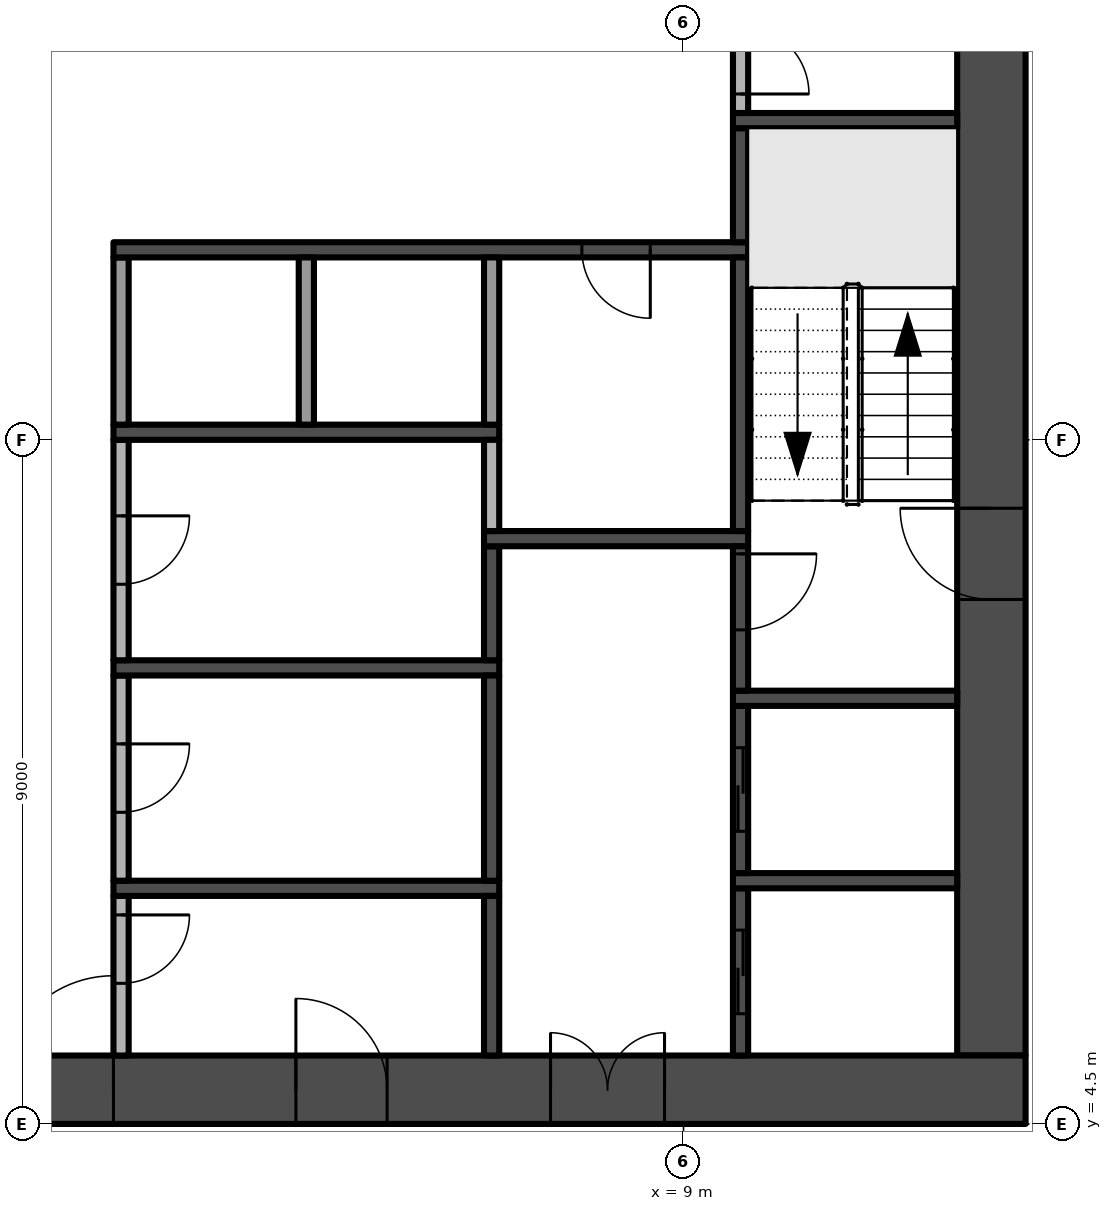
"""IFC4 building model, lengths in metres.
Left out: names, types, materials, properties, quantities, classifications, styles, units other than length and angle.
Written with IfcOpenShell. Run it as: python <this file> out.ifc"""

import sys

from ifc_helpers import new_model, si_unit, direction, frame, frame_2d, origin, place, context, subcontext, project, spatial, rectangle, extrude, element, fill, save


model = new_model("IFC4")
c1 = context("Model", 3, precision=1e-05, world=origin(), true_north=direction((0.0, 1.0)))
c2 = subcontext(c1, "Body", "Model", "MODEL_VIEW")
j1 = project(units=[si_unit("LENGTHUNIT", "METRE"), si_unit("PLANEANGLEUNIT", "RADIAN")], contexts=[c1])
p1 = place(None, origin())
s1 = spatial("IfcSite", under=j1, at=p1, CompositionType="ELEMENT")
p2 = place(p1, origin())
s2 = spatial("IfcBuilding", under=s1, at=p2, CompositionType="ELEMENT")
p3 = place(p2, frame((0.0, 0.0, 84.6)))
s3 = spatial("IfcBuildingStorey", under=s2, at=p3, CompositionType="ELEMENT", Elevation=84.6)
p4 = place(p3, frame((-13.5, 4.95, -0.3), z_axis=(0.0, 0.0, 1.0), x_axis=(1.0, 0.0, 0.0)))
e1 = element("IfcWall", 1, at=p4, inside=s3, PredefinedType="SHEAR", context=c2, shape_type="SweptSolid", body=[
    extrude(rectangle(XDim=27.0, YDim=0.9, at=frame_2d((13.5, 0.0))), origin(), (0.0, 0.0, 1.0), 3.8),
])
p5 = place(p4, frame((12.0, 0.0, 0.3)))
e2 = element("IfcOpeningElement", 2, at=p5, cuts=e1, PredefinedType="OPENING", context=c2, shape_type="SweptSolid", body=[
    extrude(rectangle(XDim=3.0, YDim=2.4, at=frame_2d((1.5, 1.2))), frame((0.0, 0.46, 0.0), z_axis=(0.0, -1.0, 0.0), x_axis=(1.0, 0.0, 0.0)), (0.0, 0.0, 1.0), 0.92),
])
p6 = place(p4, frame((4.9, 0.0, 0.3)))
e3 = element("IfcOpeningElement", 3, at=p6, cuts=e1, PredefinedType="OPENING", context=c2, shape_type="SweptSolid", body=[
    extrude(rectangle(XDim=1.2, YDim=2.2, at=frame_2d((0.6, 1.1))), frame((0.0, 0.46, 0.0), z_axis=(0.0, -1.0, 0.0), x_axis=(1.0, 0.0, 0.0)), (0.0, 0.0, 1.0), 0.92),
])
p7 = place(p4, frame((20.75, 0.0, 0.3)))
e4 = element("IfcOpeningElement", 4, at=p7, cuts=e1, PredefinedType="OPENING", context=c2, shape_type="SweptSolid", body=[
    extrude(rectangle(XDim=1.5, YDim=2.2, at=frame_2d((0.75, 1.1))), frame((0.0, 0.46, 0.0), z_axis=(0.0, -1.0, 0.0), x_axis=(1.0, 0.0, 0.0)), (0.0, 0.0, 1.0), 0.92),
])
p8 = place(p4, frame((17.4, 0.0, 0.3)))
e5 = element("IfcOpeningElement", 5, at=p8, cuts=e1, PredefinedType="OPENING", context=c2, shape_type="SweptSolid", body=[
    extrude(rectangle(XDim=1.2, YDim=2.2, at=frame_2d((0.6, 1.1))), frame((0.0, 0.46, 0.0), z_axis=(0.0, -1.0, 0.0), x_axis=(1.0, 0.0, 0.0)), (0.0, 0.0, 1.0), 0.92),
])
p9 = place(p3, frame((13.05, 5.4, -0.3), z_axis=(0.0, 0.0, 1.0), x_axis=(0.0, 1.0, 0.0)))
e6 = element("IfcWall", 6, at=p9, inside=s3, PredefinedType="SHEAR", context=c2, shape_type="SweptSolid", body=[
    extrude(rectangle(XDim=16.2, YDim=0.9, at=frame_2d((8.1, 0.0))), origin(), (0.0, 0.0, 1.0), 3.8),
])
p10 = place(p9, frame((6.0, 0.0, 0.3)))
e7 = element("IfcOpeningElement", 7, at=p10, cuts=e6, PredefinedType="OPENING", context=c2, shape_type="SweptSolid", body=[
    extrude(rectangle(XDim=1.2, YDim=2.2, at=frame_2d((0.6, 1.1))), frame((0.0, 0.46, 0.0), z_axis=(0.0, -1.0, 0.0), x_axis=(1.0, 0.0, 0.0)), (0.0, 0.0, 1.0), 0.92),
])
p11 = place(p3, frame((1.6, 7.5, 0.0), z_axis=(0.0, 0.0, 1.0), x_axis=(0.0, -1.0, 0.0)))
e8 = element("IfcWall", 8, at=p11, inside=s3, PredefinedType="PARTITIONING", context=c2, shape_type="SweptSolid", body=[
    extrude(rectangle(XDim=2.1, YDim=0.2, at=frame_2d((1.05, 0.0))), origin(), (0.0, 0.0, 1.0), 3.5),
])
p12 = place(p11, frame((0.25, 0.0, 0.0)))
e9 = element("IfcOpeningElement", 9, at=p12, cuts=e8, PredefinedType="OPENING", context=c2, shape_type="SweptSolid", body=[
    extrude(rectangle(XDim=0.9, YDim=2.1, at=frame_2d((0.45, 1.05))), frame((0.0, 0.11, 0.0), z_axis=(0.0, -1.0, 0.0), x_axis=(1.0, 0.0, 0.0)), (0.0, 0.0, 1.0), 0.22),
])
p13 = place(p3, frame((1.5, 7.6, 0.0), z_axis=(0.0, 0.0, 1.0), x_axis=(1.0, 0.0, 0.0)))
e10 = element("IfcWall", 10, at=p13, inside=s3, PredefinedType="SHEAR", context=c2, shape_type="SweptSolid", body=[
    extrude(rectangle(XDim=5.075, YDim=0.2, at=frame_2d((2.538, 0.0))), origin(), (0.0, 0.0, 1.0), 3.5),
])
p14 = place(p3, frame((1.6, 10.4, 0.0), z_axis=(0.0, 0.0, 1.0), x_axis=(0.0, -1.0, 0.0)))
e11 = element("IfcWall", 11, at=p14, inside=s3, PredefinedType="PARTITIONING", context=c2, shape_type="SweptSolid", body=[
    extrude(rectangle(XDim=2.7, YDim=0.2, at=frame_2d((1.35, 0.0))), origin(), (0.0, 0.0, 1.0), 3.5),
])
p15 = place(p14, frame((0.9, 0.0, 0.0)))
e12 = element("IfcOpeningElement", 12, at=p15, cuts=e11, PredefinedType="OPENING", context=c2, shape_type="SweptSolid", body=[
    extrude(rectangle(XDim=0.9, YDim=2.1, at=frame_2d((0.45, 1.05))), frame((0.0, 0.11, 0.0), z_axis=(0.0, -1.0, 0.0), x_axis=(1.0, 0.0, 0.0)), (0.0, 0.0, 1.0), 0.22),
])
p16 = place(p3, frame((1.5, 10.5, 0.0), z_axis=(0.0, 0.0, 1.0), x_axis=(1.0, 0.0, 0.0)))
e13 = element("IfcWall", 13, at=p16, inside=s3, PredefinedType="SHEAR", context=c2, shape_type="SweptSolid", body=[
    extrude(rectangle(XDim=5.075, YDim=0.2, at=frame_2d((2.538, 0.0))), origin(), (0.0, 0.0, 1.0), 3.5),
])
p17 = place(p3, frame((1.6, 13.5, 0.0), z_axis=(0.0, 0.0, 1.0), x_axis=(0.0, -1.0, 0.0)))
e14 = element("IfcWall", 14, at=p17, inside=s3, PredefinedType="PARTITIONING", context=c2, shape_type="SweptSolid", body=[
    extrude(rectangle(XDim=2.9, YDim=0.2, at=frame_2d((1.45, 0.0))), origin(), (0.0, 0.0, 1.0), 3.5),
])
p18 = place(p17, frame((1.0, 0.0, 0.0)))
e15 = element("IfcOpeningElement", 15, at=p18, cuts=e14, PredefinedType="OPENING", context=c2, shape_type="SweptSolid", body=[
    extrude(rectangle(XDim=0.9, YDim=2.1, at=frame_2d((0.45, 1.05))), frame((0.0, 0.11, 0.0), z_axis=(0.0, -1.0, 0.0), x_axis=(1.0, 0.0, 0.0)), (0.0, 0.0, 1.0), 0.22),
])
p19 = place(p3, frame((1.5, 13.6, 0.0), z_axis=(0.0, 0.0, 1.0), x_axis=(1.0, 0.0, 0.0)))
e16 = element("IfcWall", 16, at=p19, inside=s3, PredefinedType="SHEAR", context=c2, shape_type="SweptSolid", body=[
    extrude(rectangle(XDim=5.075, YDim=0.2, at=frame_2d((2.538, 0.0))), origin(), (0.0, 0.0, 1.0), 3.5),
])
p20 = place(p3, frame((1.6, 13.7, 0.0), z_axis=(0.0, 0.0, 1.0), x_axis=(0.0, 1.0, 0.0)))
e17 = element("IfcWall", 17, at=p20, inside=s3, PredefinedType="PARTITIONING", context=c2, shape_type="SweptSolid", body=[
    extrude(rectangle(XDim=2.2, YDim=0.2, at=frame_2d((1.1, 0.0))), origin(), (0.0, 0.0, 1.0), 3.5),
])
p21 = place(p3, frame((9.85, 16.0, 0.0), z_axis=(0.0, 0.0, 1.0), x_axis=(-1.0, 0.0, 0.0)))
e18 = element("IfcWall", 18, at=p21, inside=s3, PredefinedType="SHEAR", context=c2, shape_type="SweptSolid", body=[
    extrude(rectangle(XDim=8.35, YDim=0.2, at=frame_2d((4.175, 0.0))), origin(), (0.0, 0.0, 1.0), 3.5),
])
p22 = place(p21, frame((1.288, 0.0, 0.0)))
e19 = element("IfcOpeningElement", 19, at=p22, cuts=e18, PredefinedType="OPENING", context=c2, shape_type="SweptSolid", body=[
    extrude(rectangle(XDim=0.9, YDim=2.1, at=frame_2d((0.45, 1.05))), frame((0.0, 0.11, 0.0), z_axis=(0.0, -1.0, 0.0), x_axis=(1.0, 0.0, 0.0)), (0.0, 0.0, 1.0), 0.22),
])
p23 = place(p3, frame((4.037, 13.7, 0.0), z_axis=(0.0, 0.0, 1.0), x_axis=(0.0, 1.0, 0.0)))
e20 = element("IfcWall", 20, at=p23, inside=s3, PredefinedType="PARTITIONING", context=c2, shape_type="SweptSolid", body=[
    extrude(rectangle(XDim=2.2, YDim=0.2, at=frame_2d((1.1, 0.0))), origin(), (0.0, 0.0, 1.0), 3.5),
])
p24 = place(p3, frame((6.475, 5.4, 0.0), z_axis=(0.0, 0.0, 1.0), x_axis=(0.0, 1.0, 0.0)))
e21 = element("IfcWall", 21, at=p24, inside=s3, PredefinedType="SHEAR", context=c2, shape_type="SweptSolid", body=[
    extrude(rectangle(XDim=2.1, YDim=0.2, at=frame_2d((1.05, 0.0))), origin(), (0.0, 0.0, 1.0), 3.5),
])
p25 = place(p3, frame((6.475, 7.7, 0.0), z_axis=(0.0, 0.0, 1.0), x_axis=(0.0, 1.0, 0.0)))
e22 = element("IfcWall", 22, at=p25, inside=s3, PredefinedType="SHEAR", context=c2, shape_type="SweptSolid", body=[
    extrude(rectangle(XDim=2.7, YDim=0.2, at=frame_2d((1.35, 0.0))), origin(), (0.0, 0.0, 1.0), 3.5),
])
p26 = place(p3, frame((6.475, 10.6, 0.0), z_axis=(0.0, 0.0, 1.0), x_axis=(0.0, 1.0, 0.0)))
e23 = element("IfcWall", 23, at=p26, inside=s3, PredefinedType="SHEAR", context=c2, shape_type="SweptSolid", body=[
    extrude(rectangle(XDim=1.5, YDim=0.2, at=frame_2d((0.75, 0.0))), origin(), (0.0, 0.0, 1.0), 3.5),
])
p27 = place(p3, frame((6.375, 12.2, 0.0), z_axis=(0.0, 0.0, 1.0), x_axis=(1.0, 0.0, 0.0)))
e24 = element("IfcWall", 24, at=p27, inside=s3, PredefinedType="SHEAR", context=c2, shape_type="SweptSolid", body=[
    extrude(rectangle(XDim=3.475, YDim=0.2, at=frame_2d((1.738, 0.0))), origin(), (0.0, 0.0, 1.0), 3.5),
])
p28 = place(p3, frame((6.475, 12.3, 0.0), z_axis=(0.0, 0.0, 1.0), x_axis=(0.0, 1.0, 0.0)))
e25 = element("IfcWall", 25, at=p28, inside=s3, PredefinedType="PARTITIONING", context=c2, shape_type="SweptSolid", body=[
    extrude(rectangle(XDim=1.2, YDim=0.2, at=frame_2d((0.6, 0.0))), origin(), (0.0, 0.0, 1.0), 3.5),
])
p29 = place(p3, frame((6.475, 13.7, 0.0), z_axis=(0.0, 0.0, 1.0), x_axis=(0.0, 1.0, 0.0)))
e26 = element("IfcWall", 26, at=p29, inside=s3, PredefinedType="PARTITIONING", context=c2, shape_type="SweptSolid", body=[
    extrude(rectangle(XDim=2.2, YDim=0.2, at=frame_2d((1.1, 0.0))), origin(), (0.0, 0.0, 1.0), 3.5),
])
p30 = place(p3, frame((9.75, 5.4, 0.0), z_axis=(0.0, 0.0, 1.0), x_axis=(0.0, 1.0, 0.0)))
e27 = element("IfcWall", 27, at=p30, inside=s3, PredefinedType="SHEAR", context=c2, shape_type="SweptSolid", body=[
    extrude(rectangle(XDim=2.2, YDim=0.2, at=frame_2d((1.1, 0.0))), origin(), (0.0, 0.0, 1.0), 3.5),
])
p31 = place(p30, frame((0.55, 0.0, 0.0)))
e28 = element("IfcOpeningElement", 28, at=p31, cuts=e27, PredefinedType="OPENING", context=c2, shape_type="SweptSolid", body=[
    extrude(rectangle(XDim=1.1, YDim=2.1, at=frame_2d((0.55, 1.05))), frame((0.0, 0.11, 0.0), z_axis=(0.0, -1.0, 0.0), x_axis=(1.0, 0.0, 0.0)), (0.0, 0.0, 1.0), 0.22),
])
p32 = place(p3, frame((9.65, 7.7, 0.0), z_axis=(0.0, 0.0, 1.0), x_axis=(1.0, 0.0, 0.0)))
e29 = element("IfcWall", 29, at=p32, inside=s3, PredefinedType="SHEAR", context=c2, shape_type="SweptSolid", body=[
    extrude(rectangle(XDim=2.95, YDim=0.2, at=frame_2d((1.475, 0.0))), origin(), (0.0, 0.0, 1.0), 3.5),
])
p33 = place(p3, frame((9.75, 7.8, 0.0), z_axis=(0.0, 0.0, 1.0), x_axis=(0.0, 1.0, 0.0)))
e30 = element("IfcWall", 30, at=p33, inside=s3, PredefinedType="SHEAR", context=c2, shape_type="SweptSolid", body=[
    extrude(rectangle(XDim=2.2, YDim=0.2, at=frame_2d((1.1, 0.0))), origin(), (0.0, 0.0, 1.0), 3.5),
])
p34 = place(p33, frame((0.55, 0.0, 0.0)))
e31 = element("IfcOpeningElement", 31, at=p34, cuts=e30, PredefinedType="OPENING", context=c2, shape_type="SweptSolid", body=[
    extrude(rectangle(XDim=1.1, YDim=2.1, at=frame_2d((0.55, 1.05))), frame((0.0, 0.11, 0.0), z_axis=(0.0, -1.0, 0.0), x_axis=(1.0, 0.0, 0.0)), (0.0, 0.0, 1.0), 0.22),
])
p35 = place(p3, frame((9.65, 10.1, 0.0), z_axis=(0.0, 0.0, 1.0), x_axis=(1.0, 0.0, 0.0)))
e32 = element("IfcWall", 32, at=p35, inside=s3, PredefinedType="SHEAR", context=c2, shape_type="SweptSolid", body=[
    extrude(rectangle(XDim=2.95, YDim=0.2, at=frame_2d((1.475, 0.0))), origin(), (0.0, 0.0, 1.0), 3.5),
])
p36 = place(p3, frame((9.75, 12.1, 0.0), z_axis=(0.0, 0.0, 1.0), x_axis=(0.0, -1.0, 0.0)))
e33 = element("IfcWall", 33, at=p36, inside=s3, PredefinedType="SHEAR", context=c2, shape_type="SweptSolid", body=[
    extrude(rectangle(XDim=1.9, YDim=0.2, at=frame_2d((0.95, 0.0))), origin(), (0.0, 0.0, 1.0), 3.5),
])
p37 = place(p36, frame((0.1, 0.0, 0.0)))
e34 = element("IfcOpeningElement", 34, at=p37, cuts=e33, PredefinedType="OPENING", context=c2, shape_type="SweptSolid", body=[
    extrude(rectangle(XDim=1.0, YDim=2.2, at=frame_2d((0.5, 1.1))), frame((0.0, 0.11, 0.0), z_axis=(0.0, -1.0, 0.0), x_axis=(1.0, 0.0, 0.0)), (0.0, 0.0, 1.0), 0.22),
])
p38 = place(p3, frame((9.75, 12.3, 0.0), z_axis=(0.0, 0.0, 1.0), x_axis=(0.0, 1.0, 0.0)))
e35 = element("IfcWall", 35, at=p38, inside=s3, PredefinedType="SHEAR", context=c2, shape_type="SweptSolid", body=[
    extrude(rectangle(XDim=3.6, YDim=0.2, at=frame_2d((1.8, 0.0))), origin(), (0.0, 0.0, 1.0), 3.5),
])
p39 = place(p3, frame((9.75, 16.1, 0.0), z_axis=(0.0, 0.0, 1.0), x_axis=(0.0, 1.0, 0.0)))
e36 = element("IfcWall", 36, at=p39, inside=s3, PredefinedType="SHEAR", context=c2, shape_type="SweptSolid", body=[
    extrude(rectangle(XDim=1.5, YDim=0.2, at=frame_2d((0.75, 0.0))), origin(), (0.0, 0.0, 1.0), 3.5),
])
p40 = place(p3, frame((9.65, 17.7, 0.0), z_axis=(0.0, 0.0, 1.0), x_axis=(1.0, 0.0, 0.0)))
e37 = element("IfcWall", 37, at=p40, inside=s3, PredefinedType="SHEAR", context=c2, shape_type="SweptSolid", body=[
    extrude(rectangle(XDim=2.95, YDim=0.2, at=frame_2d((1.475, 0.0))), origin(), (0.0, 0.0, 1.0), 3.5),
])
p41 = place(p3, frame((9.75, 19.2, 0.0), z_axis=(0.0, 0.0, 1.0), x_axis=(0.0, -1.0, 0.0)))
e38 = element("IfcWall", 38, at=p41, inside=s3, PredefinedType="PARTITIONING", context=c2, shape_type="SweptSolid", body=[
    extrude(rectangle(XDim=1.4, YDim=0.2, at=frame_2d((0.7, 0.0))), origin(), (0.0, 0.0, 1.0), 3.5),
])
p42 = place(p41, frame((0.25, 0.0, 0.0)))
e39 = element("IfcOpeningElement", 39, at=p42, cuts=e38, PredefinedType="OPENING", context=c2, shape_type="SweptSolid", body=[
    extrude(rectangle(XDim=0.9, YDim=2.1, at=frame_2d((0.45, 1.05))), frame((0.0, 0.11, 0.0), z_axis=(0.0, -1.0, 0.0), x_axis=(1.0, 0.0, 0.0)), (0.0, 0.0, 1.0), 0.22),
])
p43 = place(p5, frame((3.0, 0.0, 0.0), z_axis=(0.0, 0.0, 1.0), x_axis=(-1.0, 0.0, 0.0)))
e40 = element("IfcDoor", 40, at=p43, inside=s3, OperationType="DOUBLE_DOOR_SINGLE_SWING", PredefinedType="DOOR", context=c2, shape_type="SweptSolid", body=[
    extrude(rectangle(XDim=3.0, YDim=2.4, at=frame_2d((1.5, 1.2))), frame((0.0, 0.025, 0.0), z_axis=(0.0, -1.0, 0.0), x_axis=(1.0, 0.0, 0.0)), (0.0, 0.0, 1.0), 0.05),
])
fill(e2, e40)
p44 = place(p10, frame((1.2, 0.0, 0.0), z_axis=(0.0, 0.0, 1.0), x_axis=(-1.0, 0.0, 0.0)))
e41 = element("IfcDoor", 41, at=p44, inside=s3, OperationType="SINGLE_SWING_LEFT", PredefinedType="DOOR", context=c2, shape_type="SweptSolid", body=[
    extrude(rectangle(XDim=1.2, YDim=2.2, at=frame_2d((0.6, 1.1))), frame((0.0, 0.025, 0.0), z_axis=(0.0, -1.0, 0.0), x_axis=(1.0, 0.0, 0.0)), (0.0, 0.0, 1.0), 0.05),
])
fill(e7, e41)
p45 = place(p7, frame((1.5, 0.0, 0.0), z_axis=(0.0, 0.0, 1.0), x_axis=(-1.0, 0.0, 0.0)))
e42 = element("IfcDoor", 42, at=p45, inside=s3, OperationType="DOUBLE_DOOR_SINGLE_SWING", PredefinedType="DOOR", context=c2, shape_type="SweptSolid", body=[
    extrude(rectangle(XDim=1.5, YDim=2.2, at=frame_2d((0.75, 1.1))), frame((0.0, 0.025, 0.0), z_axis=(0.0, -1.0, 0.0), x_axis=(1.0, 0.0, 0.0)), (0.0, 0.0, 1.0), 0.05),
])
fill(e4, e42)
p46 = place(p8, frame((1.2, 0.0, 0.0), z_axis=(0.0, 0.0, 1.0), x_axis=(-1.0, 0.0, 0.0)))
e43 = element("IfcDoor", 43, at=p46, inside=s3, OperationType="SINGLE_SWING_RIGHT", PredefinedType="DOOR", context=c2, shape_type="SweptSolid", body=[
    extrude(rectangle(XDim=1.2, YDim=2.2, at=frame_2d((0.6, 1.1))), frame((0.0, 0.025, 0.0), z_axis=(0.0, -1.0, 0.0), x_axis=(1.0, 0.0, 0.0)), (0.0, 0.0, 1.0), 0.05),
])
fill(e5, e43)
p47 = place(p37, origin())
e44 = element("IfcDoor", 44, at=p47, inside=s3, OperationType="SINGLE_SWING_LEFT", PredefinedType="DOOR", context=c2, shape_type="SweptSolid", body=[
    extrude(rectangle(XDim=1.0, YDim=2.2, at=frame_2d((0.5, 1.1))), frame((0.0, 0.025, 0.0), z_axis=(0.0, -1.0, 0.0), x_axis=(1.0, 0.0, 0.0)), (0.0, 0.0, 1.0), 0.05),
])
fill(e34, e44)
p48 = place(p31, origin())
e45 = element("IfcDoor", 45, at=p48, inside=s3, OperationType="SLIDING_TO_RIGHT", PredefinedType="DOOR", context=c2, shape_type="SweptSolid", body=[
    extrude(rectangle(XDim=1.1, YDim=2.1, at=frame_2d((0.55, 1.05))), frame((0.0, 0.025, 0.0), z_axis=(0.0, -1.0, 0.0), x_axis=(1.0, 0.0, 0.0)), (0.0, 0.0, 1.0), 0.05),
])
fill(e28, e45)
p49 = place(p34, origin())
e46 = element("IfcDoor", 46, at=p49, inside=s3, OperationType="SLIDING_TO_RIGHT", PredefinedType="DOOR", context=c2, shape_type="SweptSolid", body=[
    extrude(rectangle(XDim=1.1, YDim=2.1, at=frame_2d((0.55, 1.05))), frame((0.0, 0.025, 0.0), z_axis=(0.0, -1.0, 0.0), x_axis=(1.0, 0.0, 0.0)), (0.0, 0.0, 1.0), 0.05),
])
fill(e31, e46)
p50 = place(p12, origin())
e47 = element("IfcDoor", 47, at=p50, inside=s3, OperationType="SINGLE_SWING_LEFT", PredefinedType="DOOR", context=c2, shape_type="SweptSolid", body=[
    extrude(rectangle(XDim=0.9, YDim=2.1, at=frame_2d((0.45, 1.05))), frame((0.0, 0.025, 0.0), z_axis=(0.0, -1.0, 0.0), x_axis=(1.0, 0.0, 0.0)), (0.0, 0.0, 1.0), 0.05),
])
fill(e9, e47)
p51 = place(p15, origin())
e48 = element("IfcDoor", 48, at=p51, inside=s3, OperationType="SINGLE_SWING_LEFT", PredefinedType="DOOR", context=c2, shape_type="SweptSolid", body=[
    extrude(rectangle(XDim=0.9, YDim=2.1, at=frame_2d((0.45, 1.05))), frame((0.0, 0.025, 0.0), z_axis=(0.0, -1.0, 0.0), x_axis=(1.0, 0.0, 0.0)), (0.0, 0.0, 1.0), 0.05),
])
fill(e12, e48)
p52 = place(p18, origin())
e49 = element("IfcDoor", 49, at=p52, inside=s3, OperationType="SINGLE_SWING_LEFT", PredefinedType="DOOR", context=c2, shape_type="SweptSolid", body=[
    extrude(rectangle(XDim=0.9, YDim=2.1, at=frame_2d((0.45, 1.05))), frame((0.0, 0.025, 0.0), z_axis=(0.0, -1.0, 0.0), x_axis=(1.0, 0.0, 0.0)), (0.0, 0.0, 1.0), 0.05),
])
fill(e15, e49)
p53 = place(p22, origin())
e50 = element("IfcDoor", 50, at=p53, inside=s3, OperationType="SINGLE_SWING_LEFT", PredefinedType="DOOR", context=c2, shape_type="SweptSolid", body=[
    extrude(rectangle(XDim=0.9, YDim=2.1, at=frame_2d((0.45, 1.05))), frame((0.0, 0.025, 0.0), z_axis=(0.0, -1.0, 0.0), x_axis=(1.0, 0.0, 0.0)), (0.0, 0.0, 1.0), 0.05),
])
fill(e19, e50)
p54 = place(p42, origin())
e51 = element("IfcDoor", 51, at=p54, inside=s3, OperationType="SINGLE_SWING_RIGHT", PredefinedType="DOOR", context=c2, shape_type="SweptSolid", body=[
    extrude(rectangle(XDim=0.9, YDim=2.1, at=frame_2d((0.45, 1.05))), frame((0.0, 0.025, 0.0), z_axis=(0.0, -1.0, 0.0), x_axis=(1.0, 0.0, 0.0)), (0.0, 0.0, 1.0), 0.05),
])
fill(e39, e51)
save(model, sys.argv[1])
